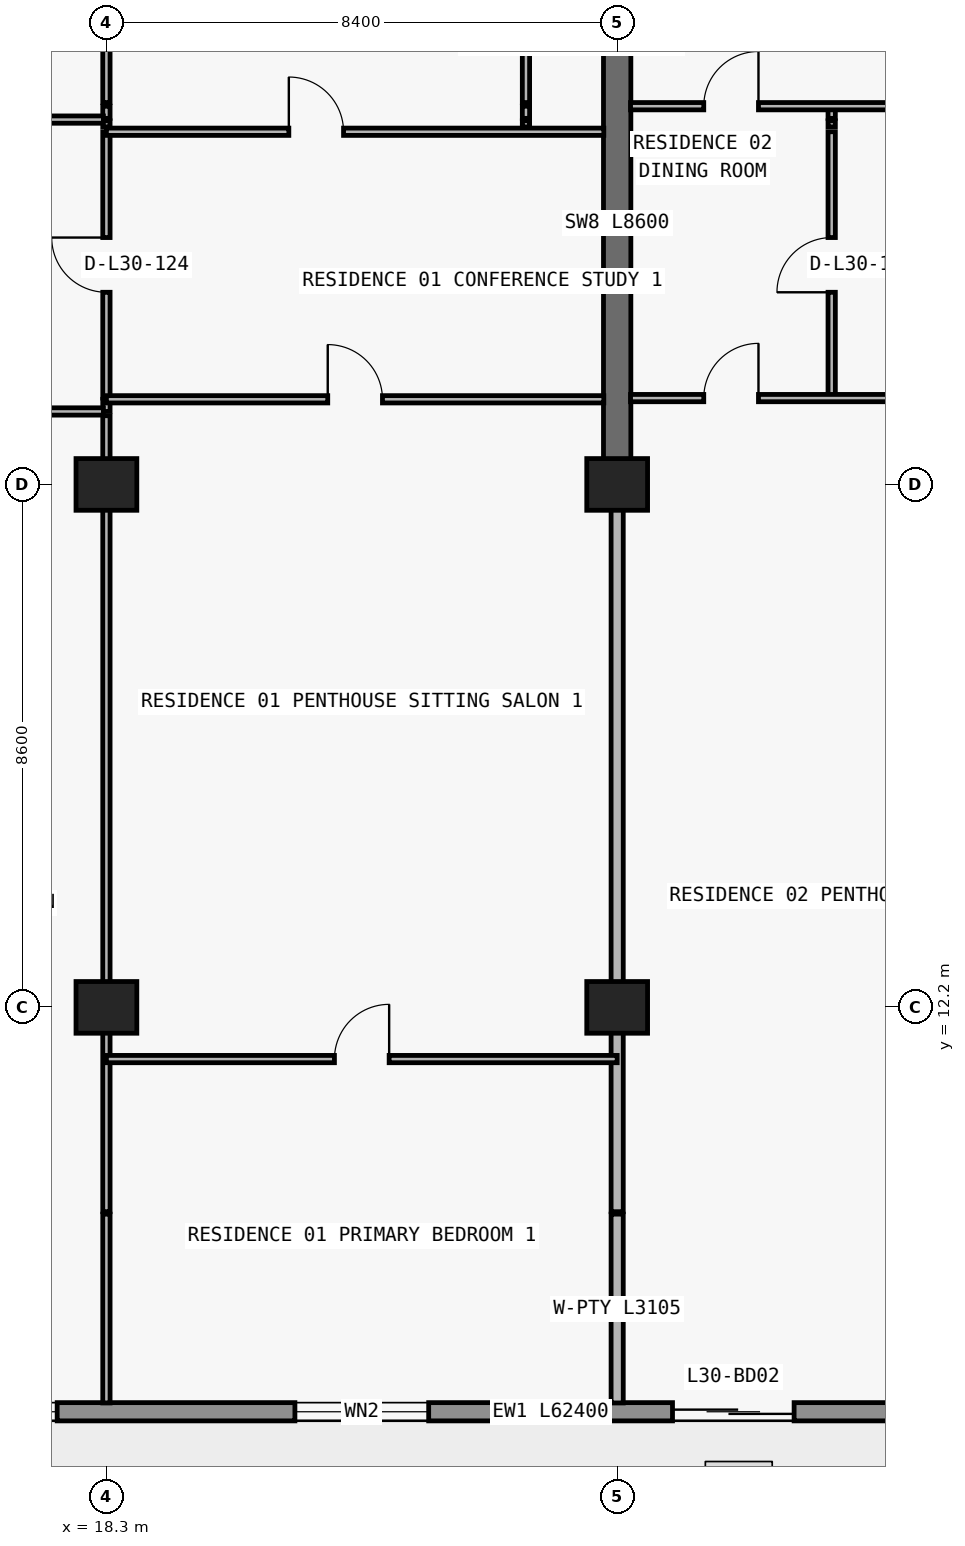
"""IFC4 building model, lengths in metres.
Left out: names, types, materials, properties, quantities, classifications, styles, units other than length and angle.
Written with IfcOpenShell. Run it as: python <this file> out.ifc"""

import sys

from ifc_helpers import new_model, si_unit, direction, frame, frame_2d, origin, origin_2d, place, context, subcontext, project, spatial, rectangle, extrude, element, fill, save


model = new_model("IFC4")
c1 = context("Model", 3, precision=1e-05, world=origin(), true_north=direction((0.0, 1.0)))
c2 = subcontext(c1, "Body", "Model", "MODEL_VIEW")
j1 = project(units=[si_unit("LENGTHUNIT", "METRE"), si_unit("PLANEANGLEUNIT", "RADIAN")], contexts=[c1])
p1 = place(None, origin())
s1 = spatial("IfcSite", under=j1, at=p1, CompositionType="ELEMENT")
p2 = place(p1, origin())
s2 = spatial("IfcBuilding", under=s1, at=p2, CompositionType="ELEMENT")
p3 = place(p2, frame((0.0, 0.0, 112.5)))
s3 = spatial("IfcBuildingStorey", under=s2, at=p3, CompositionType="ELEMENT", Elevation=112.5)
for number, where, z_axis, x_axis in (
    (1, (18.3, 12.2, 0.0), (0.0, 0.0, 1.0), (1.0, 0.0, 0.0)),
    (2, (26.7, 12.2, 0.0), (0.0, 0.0, 1.0), (1.0, 0.0, 0.0)),
    (3, (18.3, 20.8, 0.0), (0.0, 0.0, 1.0), (1.0, 0.0, 0.0)),
    (4, (26.7, 20.8, 0.0), (0.0, 0.0, 1.0), (1.0, 0.0, 0.0)),
):
    element("IfcColumn", number, at=place(p3, frame(where, z_axis=z_axis, x_axis=x_axis)), inside=s3, PredefinedType="COLUMN", context=c2, shape_type="SweptSolid", body=[
        extrude(rectangle(XDim=1.0, YDim=0.85, at=origin_2d()), origin(), (0.0, 0.0, 1.0), 3.05),
    ])
p4 = place(p3, frame((26.7, 20.8, 0.0), z_axis=(0.0, 0.0, 1.0), x_axis=(0.0, 1.0, 0.0)))
e5 = element("IfcWall", 5, at=p4, inside=s3, PredefinedType="SHEAR", context=c2, shape_type="SweptSolid", body=[
    extrude(rectangle(XDim=8.6, YDim=0.45, at=frame_2d((4.3, 0.0))), origin(), (0.0, 0.0, 1.0), 3.05),
])
p5 = place(p3, frame((70.1, 5.55, 0.0), z_axis=(0.0, 0.0, 1.0), x_axis=(-1.0, 0.0, 0.0)))
e6 = element("IfcWall", 6, at=p5, inside=s3, PredefinedType="STANDARD", context=c2, shape_type="SweptSolid", body=[
    extrude(rectangle(XDim=62.4, YDim=0.3, at=frame_2d((31.2, 0.0))), origin(), (0.0, 0.0, 1.0), 3.05),
])
p6 = place(p5, frame((57.29, 0.0, 0.0)))
e7 = element("IfcOpeningElement", 7, at=p6, cuts=e6, PredefinedType="OPENING", context=c2, shape_type="SweptSolid", body=[
    extrude(rectangle(XDim=2.0, YDim=2.3, at=frame_2d((1.0, 1.15))), frame((0.0, 0.16, 0.0), z_axis=(0.0, -1.0, 0.0), x_axis=(1.0, 0.0, 0.0)), (0.0, 0.0, 1.0), 0.32),
])
p7 = place(p5, frame((52.61, 0.0, 0.65)))
e8 = element("IfcOpeningElement", 8, at=p7, cuts=e6, PredefinedType="OPENING", context=c2, shape_type="SweptSolid", body=[
    extrude(rectangle(XDim=2.6, YDim=1.85, at=frame_2d((1.3, 0.925))), frame((0.0, 0.16, 0.0), z_axis=(0.0, -1.0, 0.0), x_axis=(1.0, 0.0, 0.0)), (0.0, 0.0, 1.0), 0.32),
])
p8 = place(p5, frame((46.5, 0.0, 0.85)))
e9 = element("IfcOpeningElement", 9, at=p8, cuts=e6, PredefinedType="OPENING", context=c2, shape_type="SweptSolid", body=[
    extrude(rectangle(XDim=2.2, YDim=1.55, at=frame_2d((1.1, 0.775))), frame((0.0, 0.16, 0.0), z_axis=(0.0, -1.0, 0.0), x_axis=(1.0, 0.0, 0.0)), (0.0, 0.0, 1.0), 0.32),
])
p9 = place(p5, frame((40.49, 0.0, 0.0)))
e10 = element("IfcOpeningElement", 10, at=p9, cuts=e6, PredefinedType="OPENING", context=c2, shape_type="SweptSolid", body=[
    extrude(rectangle(XDim=2.0, YDim=2.3, at=frame_2d((1.0, 1.15))), frame((0.0, 0.16, 0.0), z_axis=(0.0, -1.0, 0.0), x_axis=(1.0, 0.0, 0.0)), (0.0, 0.0, 1.0), 0.32),
])
p10 = place(p5, frame((35.81, 0.0, 0.65)))
e11 = element("IfcOpeningElement", 11, at=p10, cuts=e6, PredefinedType="OPENING", context=c2, shape_type="SweptSolid", body=[
    extrude(rectangle(XDim=2.6, YDim=1.85, at=frame_2d((1.3, 0.925))), frame((0.0, 0.16, 0.0), z_axis=(0.0, -1.0, 0.0), x_axis=(1.0, 0.0, 0.0)), (0.0, 0.0, 1.0), 0.32),
])
p11 = place(p5, frame((30.1, 0.0, 0.85)))
e12 = element("IfcOpeningElement", 12, at=p11, cuts=e6, PredefinedType="OPENING", context=c2, shape_type="SweptSolid", body=[
    extrude(rectangle(XDim=2.2, YDim=1.55, at=frame_2d((1.1, 0.775))), frame((0.0, 0.16, 0.0), z_axis=(0.0, -1.0, 0.0), x_axis=(1.0, 0.0, 0.0)), (0.0, 0.0, 1.0), 0.32),
])
p12 = place(p5, frame((24.426, 0.0, 0.0)))
e13 = element("IfcOpeningElement", 13, at=p12, cuts=e6, PredefinedType="OPENING", context=c2, shape_type="SweptSolid", body=[
    extrude(rectangle(XDim=2.0, YDim=2.3, at=frame_2d((1.0, 1.15))), frame((0.0, 0.16, 0.0), z_axis=(0.0, -1.0, 0.0), x_axis=(1.0, 0.0, 0.0)), (0.0, 0.0, 1.0), 0.32),
])
p13 = place(p5, frame((20.126, 0.0, 0.85)))
e14 = element("IfcOpeningElement", 14, at=p13, cuts=e6, PredefinedType="OPENING", context=c2, shape_type="SweptSolid", body=[
    extrude(rectangle(XDim=2.2, YDim=1.55, at=frame_2d((1.1, 0.775))), frame((0.0, 0.16, 0.0), z_axis=(0.0, -1.0, 0.0), x_axis=(1.0, 0.0, 0.0)), (0.0, 0.0, 1.0), 0.32),
])
p14 = place(p5, frame((15.69, 0.0, 0.0)))
e15 = element("IfcOpeningElement", 15, at=p14, cuts=e6, PredefinedType="OPENING", context=c2, shape_type="SweptSolid", body=[
    extrude(rectangle(XDim=2.0, YDim=2.3, at=frame_2d((1.0, 1.15))), frame((0.0, 0.16, 0.0), z_axis=(0.0, -1.0, 0.0), x_axis=(1.0, 0.0, 0.0)), (0.0, 0.0, 1.0), 0.32),
])
p15 = place(p5, frame((11.59, 0.0, 0.85)))
e16 = element("IfcOpeningElement", 16, at=p15, cuts=e6, PredefinedType="OPENING", context=c2, shape_type="SweptSolid", body=[
    extrude(rectangle(XDim=1.8, YDim=1.55, at=frame_2d((0.9, 0.775))), frame((0.0, 0.16, 0.0), z_axis=(0.0, -1.0, 0.0), x_axis=(1.0, 0.0, 0.0)), (0.0, 0.0, 1.0), 0.32),
])
p16 = place(p5, frame((7.626, 0.0, 0.0)))
e17 = element("IfcOpeningElement", 17, at=p16, cuts=e6, PredefinedType="OPENING", context=c2, shape_type="SweptSolid", body=[
    extrude(rectangle(XDim=2.0, YDim=2.3, at=frame_2d((1.0, 1.15))), frame((0.0, 0.16, 0.0), z_axis=(0.0, -1.0, 0.0), x_axis=(1.0, 0.0, 0.0)), (0.0, 0.0, 1.0), 0.32),
])
p17 = place(p5, frame((3.326, 0.0, 0.85)))
e18 = element("IfcOpeningElement", 18, at=p17, cuts=e6, PredefinedType="OPENING", context=c2, shape_type="SweptSolid", body=[
    extrude(rectangle(XDim=2.2, YDim=1.55, at=frame_2d((1.1, 0.775))), frame((0.0, 0.16, 0.0), z_axis=(0.0, -1.0, 0.0), x_axis=(1.0, 0.0, 0.0)), (0.0, 0.0, 1.0), 0.32),
])
p18 = place(p3, frame((18.3, 5.695, 0.0), z_axis=(0.0, 0.0, 1.0), x_axis=(0.0, 1.0, 0.0)))
e19 = element("IfcWall", 19, at=p18, inside=s3, PredefinedType="PARTITIONING", context=c2, shape_type="SweptSolid", body=[
    extrude(rectangle(XDim=3.105, YDim=0.12, at=frame_2d((1.552, 0.0))), origin(), (0.0, 0.0, 1.0), 3.05),
])
p19 = place(p3, frame((18.3, 8.84, 0.0), z_axis=(0.0, 0.0, 1.0), x_axis=(0.0, 1.0, 0.0)))
e20 = element("IfcWall", 20, at=p19, inside=s3, PredefinedType="PARTITIONING", context=c2, shape_type="SweptSolid", body=[
    extrude(rectangle(XDim=13.09, YDim=0.12, at=frame_2d((6.545, 0.0))), origin(), (0.0, 0.0, 1.0), 2.174),
])
p20 = place(p3, frame((18.3, 22.0, 0.0), z_axis=(0.0, 0.0, 1.0), x_axis=(0.0, 1.0, 0.0)))
e21 = element("IfcWall", 21, at=p20, inside=s3, PredefinedType="PARTITIONING", context=c2, shape_type="SweptSolid", body=[
    extrude(rectangle(XDim=0.2, YDim=0.12, at=frame_2d((0.1, 0.0))), origin(), (0.0, 0.0, 1.0), 2.174),
])
p21 = place(p3, frame((18.3, 22.22, 0.0), z_axis=(0.0, 0.0, 1.0), x_axis=(0.0, 1.0, 0.0)))
e22 = element("IfcWall", 22, at=p21, inside=s3, PredefinedType="PARTITIONING", context=c2, shape_type="SweptSolid", body=[
    extrude(rectangle(XDim=4.38, YDim=0.12, at=frame_2d((2.19, 0.0))), origin(), (0.0, 0.0, 1.0), 2.174),
])
p22 = place(p21, frame((1.74, 0.0, 0.0)))
e23 = element("IfcOpeningElement", 23, at=p22, cuts=e22, PredefinedType="OPENING", context=c2, shape_type="SweptSolid", body=[
    extrude(rectangle(XDim=0.9, YDim=2.124, at=frame_2d((0.45, 1.062))), frame((0.0, 0.07, 0.0), z_axis=(0.0, -1.0, 0.0), x_axis=(1.0, 0.0, 0.0)), (0.0, 0.0, 1.0), 0.14),
])
p23 = place(p3, frame((18.3, 26.68, 0.0), z_axis=(0.0, 0.0, 1.0), x_axis=(0.0, 1.0, 0.0)))
e24 = element("IfcWall", 24, at=p23, inside=s3, PredefinedType="PARTITIONING", context=c2, shape_type="SweptSolid", body=[
    extrude(rectangle(XDim=0.1, YDim=0.12, at=frame_2d((0.05, 0.0))), origin(), (0.0, 0.0, 1.0), 2.174),
])
p24 = place(p3, frame((18.3, 26.82, 0.0), z_axis=(0.0, 0.0, 1.0), x_axis=(0.0, 1.0, 0.0)))
e25 = element("IfcWall", 25, at=p24, inside=s3, PredefinedType="PARTITIONING", context=c2, shape_type="SweptSolid", body=[
    extrude(rectangle(XDim=0.2, YDim=0.12, at=frame_2d((0.1, 0.0))), origin(), (0.0, 0.0, 1.0), 2.174),
])
p25 = place(p3, frame((18.3, 27.08, 0.0), z_axis=(0.0, 0.0, 1.0), x_axis=(0.0, 1.0, 0.0)))
e26 = element("IfcWall", 26, at=p25, inside=s3, PredefinedType="PARTITIONING", context=c2, shape_type="SweptSolid", body=[
    extrude(rectangle(XDim=6.52, YDim=0.12, at=frame_2d((3.26, 0.0))), origin(), (0.0, 0.0, 1.0), 2.174),
])
p26 = place(p3, frame((25.2, 26.68, 0.0), z_axis=(0.0, 0.0, 1.0), x_axis=(0.0, 1.0, 0.0)))
e27 = element("IfcWall", 27, at=p26, inside=s3, PredefinedType="PARTITIONING", context=c2, shape_type="SweptSolid", body=[
    extrude(rectangle(XDim=0.1, YDim=0.12, at=frame_2d((0.05, 0.0))), origin(), (0.0, 0.0, 1.0), 3.05),
])
p27 = place(p3, frame((25.2, 26.82, 0.0), z_axis=(0.0, 0.0, 1.0), x_axis=(0.0, 1.0, 0.0)))
e28 = element("IfcWall", 28, at=p27, inside=s3, PredefinedType="PARTITIONING", context=c2, shape_type="SweptSolid", body=[
    extrude(rectangle(XDim=0.2, YDim=0.12, at=frame_2d((0.1, 0.0))), origin(), (0.0, 0.0, 1.0), 3.05),
])
p28 = place(p3, frame((25.2, 27.08, 0.0), z_axis=(0.0, 0.0, 1.0), x_axis=(0.0, 1.0, 0.0)))
e29 = element("IfcWall", 29, at=p28, inside=s3, PredefinedType="PARTITIONING", context=c2, shape_type="SweptSolid", body=[
    extrude(rectangle(XDim=6.52, YDim=0.12, at=frame_2d((3.26, 0.0))), origin(), (0.0, 0.0, 1.0), 3.05),
])
p29 = place(p28, frame((3.285, 0.0, 0.0)))
e30 = element("IfcOpeningElement", 30, at=p29, cuts=e29, PredefinedType="OPENING", context=c2, shape_type="SweptSolid", body=[
    extrude(rectangle(XDim=0.85, YDim=2.1, at=frame_2d((0.425, 1.05))), frame((0.0, 0.07, 0.0), z_axis=(0.0, -1.0, 0.0), x_axis=(1.0, 0.0, 0.0)), (0.0, 0.0, 1.0), 0.14),
])
p30 = place(p3, frame((26.7, 5.695, 0.0), z_axis=(0.0, 0.0, 1.0), x_axis=(0.0, 1.0, 0.0)))
e31 = element("IfcWall", 31, at=p30, inside=s3, PredefinedType="PARTITIONING", context=c2, shape_type="SweptSolid", body=[
    extrude(rectangle(XDim=3.105, YDim=0.2, at=frame_2d((1.552, 0.0))), origin(), (0.0, 0.0, 1.0), 3.05),
])
p31 = place(p3, frame((26.7, 8.84, 0.0), z_axis=(0.0, 0.0, 1.0), x_axis=(0.0, 1.0, 0.0)))
e32 = element("IfcWall", 32, at=p31, inside=s3, PredefinedType="PARTITIONING", context=c2, shape_type="SweptSolid", body=[
    extrude(rectangle(XDim=11.955, YDim=0.2, at=frame_2d((5.978, 0.0))), origin(), (0.0, 0.0, 1.0), 2.174),
])
p32 = place(p3, frame((30.228, 22.22, 0.0), z_axis=(0.0, 0.0, 1.0), x_axis=(0.0, 1.0, 0.0)))
e33 = element("IfcWall", 33, at=p32, inside=s3, PredefinedType="PARTITIONING", context=c2, shape_type="SweptSolid", body=[
    extrude(rectangle(XDim=4.38, YDim=0.12, at=frame_2d((2.19, 0.0))), origin(), (0.0, 0.0, 1.0), 3.05),
])
p33 = place(p32, frame((1.74, 0.0, 0.0)))
e34 = element("IfcOpeningElement", 34, at=p33, cuts=e33, PredefinedType="OPENING", context=c2, shape_type="SweptSolid", body=[
    extrude(rectangle(XDim=0.9, YDim=2.15, at=frame_2d((0.45, 1.075))), frame((0.0, 0.07, 0.0), z_axis=(0.0, -1.0, 0.0), x_axis=(1.0, 0.0, 0.0)), (0.0, 0.0, 1.0), 0.14),
])
p34 = place(p3, frame((30.228, 26.68, 0.0), z_axis=(0.0, 0.0, 1.0), x_axis=(0.0, 1.0, 0.0)))
e35 = element("IfcWall", 35, at=p34, inside=s3, PredefinedType="PARTITIONING", context=c2, shape_type="SweptSolid", body=[
    extrude(rectangle(XDim=0.1, YDim=0.12, at=frame_2d((0.05, 0.0))), origin(), (0.0, 0.0, 1.0), 3.05),
])
p35 = place(p3, frame((30.228, 26.82, 0.0), z_axis=(0.0, 0.0, 1.0), x_axis=(0.0, 1.0, 0.0)))
e36 = element("IfcWall", 36, at=p35, inside=s3, PredefinedType="PARTITIONING", context=c2, shape_type="SweptSolid", body=[
    extrude(rectangle(XDim=0.2, YDim=0.12, at=frame_2d((0.1, 0.0))), origin(), (0.0, 0.0, 1.0), 3.05),
])
p36 = place(p3, frame((18.3, 11.35, 0.0), z_axis=(0.0, 0.0, 1.0), x_axis=(1.0, 0.0, 0.0)))
e37 = element("IfcWall", 37, at=p36, inside=s3, PredefinedType="PARTITIONING", context=c2, shape_type="SweptSolid", body=[
    extrude(rectangle(XDim=8.4, YDim=0.12, at=frame_2d((4.2, 0.0))), origin(), (0.0, 0.0, 1.0), 3.05),
])
p37 = place(p36, frame((3.75, 0.0, 0.0)))
e38 = element("IfcOpeningElement", 38, at=p37, cuts=e37, PredefinedType="OPENING", context=c2, shape_type="SweptSolid", body=[
    extrude(rectangle(XDim=0.9, YDim=2.15, at=frame_2d((0.45, 1.075))), frame((0.0, 0.07, 0.0), z_axis=(0.0, -1.0, 0.0), x_axis=(1.0, 0.0, 0.0)), (0.0, 0.0, 1.0), 0.14),
])
p38 = place(p3, frame((9.9, 22.0, 0.0), z_axis=(0.0, 0.0, 1.0), x_axis=(1.0, 0.0, 0.0)))
e39 = element("IfcWall", 39, at=p38, inside=s3, PredefinedType="PARTITIONING", context=c2, shape_type="SweptSolid", body=[
    extrude(rectangle(XDim=8.35, YDim=0.12, at=frame_2d((4.175, 0.0))), origin(), (0.0, 0.0, 1.0), 3.05),
])
p39 = place(p38, frame((1.44, 0.0, 0.0)))
e40 = element("IfcOpeningElement", 40, at=p39, cuts=e39, PredefinedType="OPENING", context=c2, shape_type="SweptSolid", body=[
    extrude(rectangle(XDim=0.9, YDim=2.15, at=frame_2d((0.45, 1.075))), frame((0.0, 0.07, 0.0), z_axis=(0.0, -1.0, 0.0), x_axis=(1.0, 0.0, 0.0)), (0.0, 0.0, 1.0), 0.14),
])
p40 = place(p3, frame((18.3, 22.2, 0.0), z_axis=(0.0, 0.0, 1.0), x_axis=(1.0, 0.0, 0.0)))
e41 = element("IfcWall", 41, at=p40, inside=s3, PredefinedType="PARTITIONING", context=c2, shape_type="SweptSolid", body=[
    extrude(rectangle(XDim=8.18, YDim=0.12, at=frame_2d((4.09, 0.0))), origin(), (0.0, 0.0, 1.0), 3.05),
])
p41 = place(p40, frame((3.64, 0.0, 0.0)))
e42 = element("IfcOpeningElement", 42, at=p41, cuts=e41, PredefinedType="OPENING", context=c2, shape_type="SweptSolid", body=[
    extrude(rectangle(XDim=0.9, YDim=2.15, at=frame_2d((0.45, 1.075))), frame((0.0, 0.07, 0.0), z_axis=(0.0, -1.0, 0.0), x_axis=(1.0, 0.0, 0.0)), (0.0, 0.0, 1.0), 0.14),
])
p42 = place(p3, frame((26.92, 22.22, 0.0), z_axis=(0.0, 0.0, 1.0), x_axis=(1.0, 0.0, 0.0)))
e43 = element("IfcWall", 43, at=p42, inside=s3, PredefinedType="PARTITIONING", context=c2, shape_type="SweptSolid", body=[
    extrude(rectangle(XDim=8.18, YDim=0.12, at=frame_2d((4.09, 0.0))), origin(), (0.0, 0.0, 1.0), 3.05),
])
p43 = place(p42, frame((1.204, 0.0, 0.0)))
e44 = element("IfcOpeningElement", 44, at=p43, cuts=e43, PredefinedType="OPENING", context=c2, shape_type="SweptSolid", body=[
    extrude(rectangle(XDim=0.9, YDim=2.15, at=frame_2d((0.45, 1.075))), frame((0.0, 0.07, 0.0), z_axis=(0.0, -1.0, 0.0), x_axis=(1.0, 0.0, 0.0)), (0.0, 0.0, 1.0), 0.14),
])
p44 = place(p3, frame((18.3, 26.6, 0.0), z_axis=(0.0, 0.0, 1.0), x_axis=(1.0, 0.0, 0.0)))
e45 = element("IfcWall", 45, at=p44, inside=s3, PredefinedType="PARTITIONING", context=c2, shape_type="SweptSolid", body=[
    extrude(rectangle(XDim=8.18, YDim=0.12, at=frame_2d((4.09, 0.0))), origin(), (0.0, 0.0, 1.0), 3.05),
])
p45 = place(p44, frame((3.0, 0.0, 0.0)))
e46 = element("IfcOpeningElement", 46, at=p45, cuts=e45, PredefinedType="OPENING", context=c2, shape_type="SweptSolid", body=[
    extrude(rectangle(XDim=0.9, YDim=2.15, at=frame_2d((0.45, 1.075))), frame((0.0, 0.07, 0.0), z_axis=(0.0, -1.0, 0.0), x_axis=(1.0, 0.0, 0.0)), (0.0, 0.0, 1.0), 0.14),
])
p46 = place(p3, frame((9.9, 26.8, 0.0), z_axis=(0.0, 0.0, 1.0), x_axis=(1.0, 0.0, 0.0)))
e47 = element("IfcWall", 47, at=p46, inside=s3, PredefinedType="PARTITIONING", context=c2, shape_type="SweptSolid", body=[
    extrude(rectangle(XDim=8.35, YDim=0.12, at=frame_2d((4.175, 0.0))), origin(), (0.0, 0.0, 1.0), 3.05),
])
p47 = place(p46, frame((1.44, 0.0, 0.0)))
e48 = element("IfcOpeningElement", 48, at=p47, cuts=e47, PredefinedType="OPENING", context=c2, shape_type="SweptSolid", body=[
    extrude(rectangle(XDim=0.9, YDim=2.15, at=frame_2d((0.45, 1.075))), frame((0.0, 0.07, 0.0), z_axis=(0.0, -1.0, 0.0), x_axis=(1.0, 0.0, 0.0)), (0.0, 0.0, 1.0), 0.14),
])
p48 = place(p3, frame((26.92, 27.02, 0.0), z_axis=(0.0, 0.0, 1.0), x_axis=(1.0, 0.0, 0.0)))
e49 = element("IfcWall", 49, at=p48, inside=s3, PredefinedType="PARTITIONING", context=c2, shape_type="SweptSolid", body=[
    extrude(rectangle(XDim=8.175, YDim=0.12, at=frame_2d((4.087, 0.0))), origin(), (0.0, 0.0, 1.0), 3.05),
])
p49 = place(p48, frame((1.204, 0.0, 0.0)))
e50 = element("IfcOpeningElement", 50, at=p49, cuts=e49, PredefinedType="OPENING", context=c2, shape_type="SweptSolid", body=[
    extrude(rectangle(XDim=0.9, YDim=2.15, at=frame_2d((0.45, 1.075))), frame((0.0, 0.07, 0.0), z_axis=(0.0, -1.0, 0.0), x_axis=(1.0, 0.0, 0.0)), (0.0, 0.0, 1.0), 0.14),
])
p50 = place(p7, origin())
e51 = element("IfcWindow", 51, at=p50, inside=s3, PartitioningType="SINGLE_PANEL", PredefinedType="WINDOW", context=c2, shape_type="SweptSolid", body=[
    extrude(rectangle(XDim=2.6, YDim=1.85, at=frame_2d((1.3, 0.925))), frame((0.0, 0.03, 0.0), z_axis=(0.0, -1.0, 0.0), x_axis=(1.0, 0.0, 0.0)), (0.0, 0.0, 1.0), 0.06),
])
fill(e8, e51)
p51 = place(p8, origin())
e52 = element("IfcWindow", 52, at=p51, inside=s3, PartitioningType="SINGLE_PANEL", PredefinedType="WINDOW", context=c2, shape_type="SweptSolid", body=[
    extrude(rectangle(XDim=2.2, YDim=1.55, at=frame_2d((1.1, 0.775))), frame((0.0, 0.03, 0.0), z_axis=(0.0, -1.0, 0.0), x_axis=(1.0, 0.0, 0.0)), (0.0, 0.0, 1.0), 0.06),
])
fill(e9, e52)
p52 = place(p9, origin())
e53 = element("IfcDoor", 53, at=p52, inside=s3, OperationType="DOUBLE_DOOR_SLIDING", PredefinedType="DOOR", context=c2, shape_type="SweptSolid", body=[
    extrude(rectangle(XDim=2.0, YDim=2.3, at=frame_2d((1.0, 1.15))), frame((0.0, 0.025, 0.0), z_axis=(0.0, -1.0, 0.0), x_axis=(1.0, 0.0, 0.0)), (0.0, 0.0, 1.0), 0.05),
])
fill(e10, e53)
p53 = place(p22, origin())
e54 = element("IfcDoor", 54, at=p53, inside=s3, OperationType="SINGLE_SWING_RIGHT", PredefinedType="DOOR", context=c2, shape_type="SweptSolid", body=[
    extrude(rectangle(XDim=0.9, YDim=2.124, at=frame_2d((0.45, 1.062))), frame((0.0, 0.025, 0.0), z_axis=(0.0, -1.0, 0.0), x_axis=(1.0, 0.0, 0.0)), (0.0, 0.0, 1.0), 0.05),
])
fill(e23, e54)
p54 = place(p45, origin())
e55 = element("IfcDoor", 55, at=p54, inside=s3, OperationType="SINGLE_SWING_LEFT", PredefinedType="DOOR", context=c2, shape_type="SweptSolid", body=[
    extrude(rectangle(XDim=0.9, YDim=2.15, at=frame_2d((0.45, 1.075))), frame((0.0, 0.025, 0.0), z_axis=(0.0, -1.0, 0.0), x_axis=(1.0, 0.0, 0.0)), (0.0, 0.0, 1.0), 0.05),
])
fill(e46, e55)
p55 = place(p41, origin())
e56 = element("IfcDoor", 56, at=p55, inside=s3, OperationType="SINGLE_SWING_LEFT", PredefinedType="DOOR", context=c2, shape_type="SweptSolid", body=[
    extrude(rectangle(XDim=0.9, YDim=2.15, at=frame_2d((0.45, 1.075))), frame((0.0, 0.025, 0.0), z_axis=(0.0, -1.0, 0.0), x_axis=(1.0, 0.0, 0.0)), (0.0, 0.0, 1.0), 0.05),
])
fill(e42, e56)
p56 = place(p37, origin())
e57 = element("IfcDoor", 57, at=p56, inside=s3, OperationType="SINGLE_SWING_RIGHT", PredefinedType="DOOR", context=c2, shape_type="SweptSolid", body=[
    extrude(rectangle(XDim=0.9, YDim=2.15, at=frame_2d((0.45, 1.075))), frame((0.0, 0.025, 0.0), z_axis=(0.0, -1.0, 0.0), x_axis=(1.0, 0.0, 0.0)), (0.0, 0.0, 1.0), 0.05),
])
fill(e38, e57)
p57 = place(p49, origin())
e58 = element("IfcDoor", 58, at=p57, inside=s3, OperationType="SINGLE_SWING_RIGHT", PredefinedType="DOOR", context=c2, shape_type="SweptSolid", body=[
    extrude(rectangle(XDim=0.9, YDim=2.15, at=frame_2d((0.45, 1.075))), frame((0.0, 0.025, 0.0), z_axis=(0.0, -1.0, 0.0), x_axis=(1.0, 0.0, 0.0)), (0.0, 0.0, 1.0), 0.05),
])
fill(e50, e58)
p58 = place(p33, origin())
e59 = element("IfcDoor", 59, at=p58, inside=s3, OperationType="SINGLE_SWING_LEFT", PredefinedType="DOOR", context=c2, shape_type="SweptSolid", body=[
    extrude(rectangle(XDim=0.9, YDim=2.15, at=frame_2d((0.45, 1.075))), frame((0.0, 0.025, 0.0), z_axis=(0.0, -1.0, 0.0), x_axis=(1.0, 0.0, 0.0)), (0.0, 0.0, 1.0), 0.05),
])
fill(e34, e59)
p59 = place(p43, origin())
e60 = element("IfcDoor", 60, at=p59, inside=s3, OperationType="SINGLE_SWING_RIGHT", PredefinedType="DOOR", context=c2, shape_type="SweptSolid", body=[
    extrude(rectangle(XDim=0.9, YDim=2.15, at=frame_2d((0.45, 1.075))), frame((0.0, 0.025, 0.0), z_axis=(0.0, -1.0, 0.0), x_axis=(1.0, 0.0, 0.0)), (0.0, 0.0, 1.0), 0.05),
])
fill(e44, e60)
save(model, sys.argv[1])
